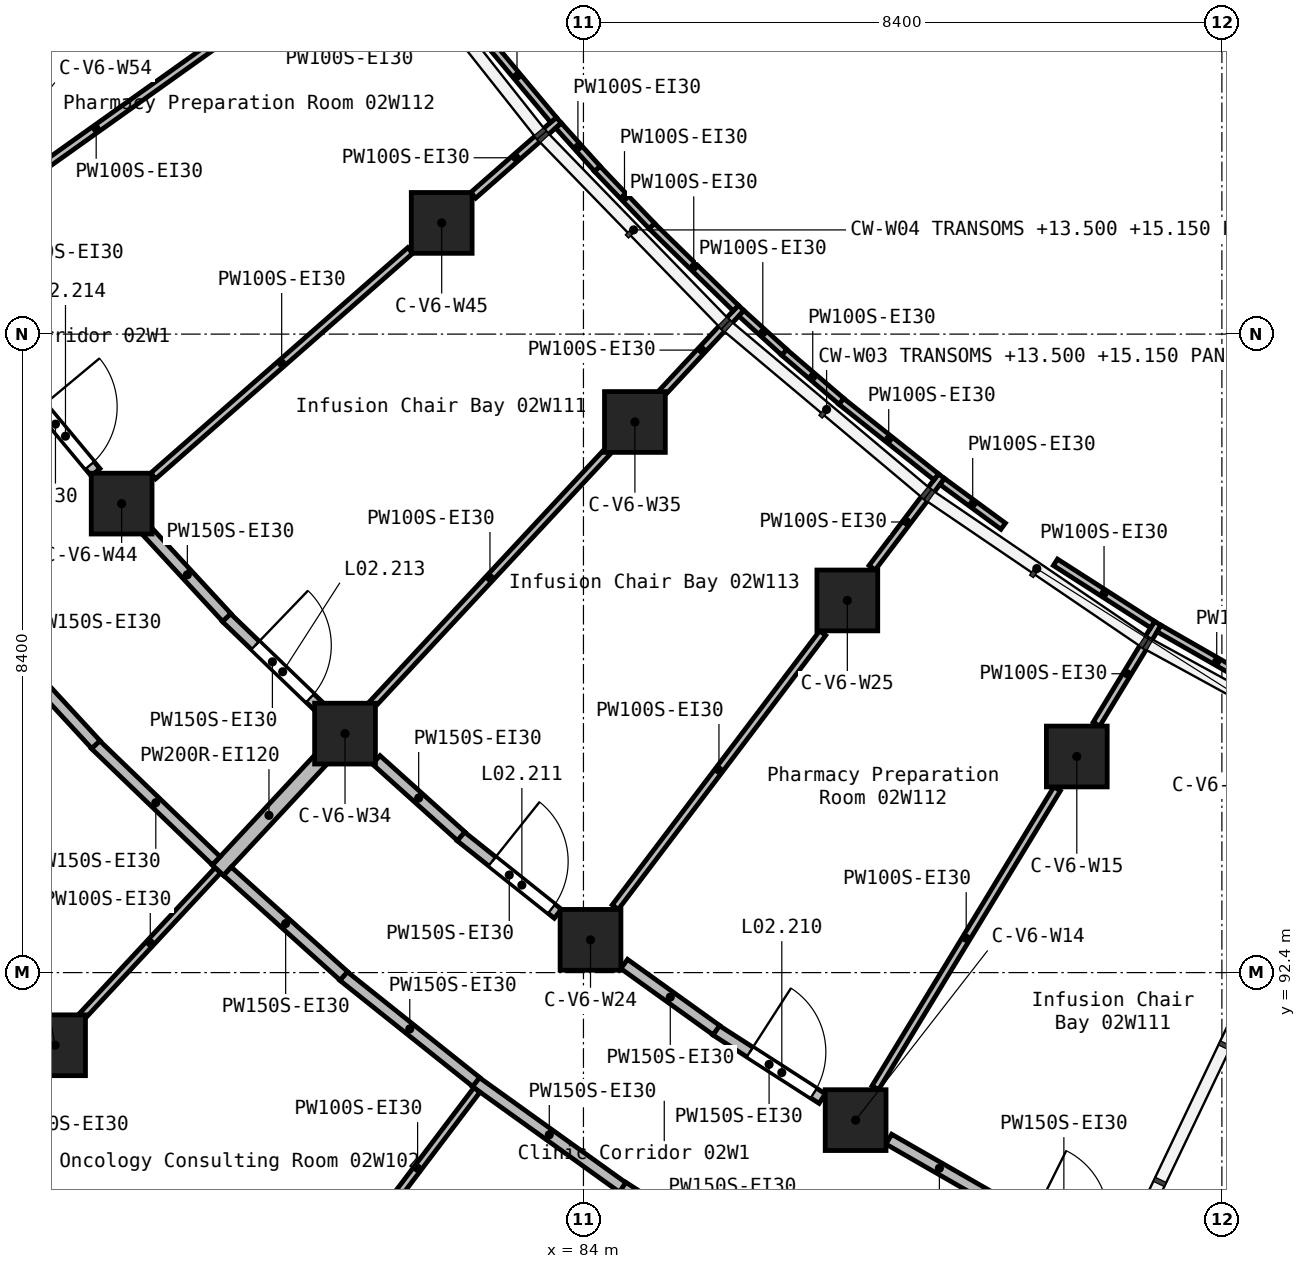
"""IFC4 building model, lengths in metres.
Left out: names, types, materials, properties, quantities, classifications, styles, units other than length and angle.
Written with IfcOpenShell. Run it as: python <this file> out.ifc"""

import sys

from ifc_helpers import new_model, si_unit, direction, frame, frame_2d, origin, origin_2d, place, context, subcontext, project, spatial, rectangle, extrude, element, fill, save


model = new_model("IFC4")
c1 = context("Model", 3, precision=1e-05, world=origin(), true_north=direction((0.0, 1.0)))
c2 = subcontext(c1, "Body", "Model", "MODEL_VIEW")
j1 = project(units=[si_unit("LENGTHUNIT", "METRE"), si_unit("PLANEANGLEUNIT", "RADIAN")], contexts=[c1])
p1 = place(None, origin())
s1 = spatial("IfcSite", under=j1, at=p1, CompositionType="ELEMENT")
p2 = place(p1, origin())
s2 = spatial("IfcBuilding", under=s1, at=p2, CompositionType="ELEMENT")
p3 = place(p2, frame((0.0, 0.0, 12.6)))
s3 = spatial("IfcBuildingStorey", under=s2, at=p3, CompositionType="ELEMENT", Elevation=12.6)
for number, where, z_axis, x_axis in (
    (1, (77.048, 91.444, 0.0), (0.0, 0.0, 1.0), (1.0, 0.0, 0.0)),
    (2, (77.924, 98.57, 0.0), (0.0, 0.0, 1.0), (1.0, 0.0, 0.0)),
    (3, (80.863, 95.544, 0.0), (0.0, 0.0, 1.0), (1.0, 0.0, 0.0)),
    (4, (82.135, 102.263, 0.0), (0.0, 0.0, 1.0), (1.0, 0.0, 0.0)),
    (5, (84.093, 92.831, 0.0), (0.0, 0.0, 1.0), (1.0, 0.0, 0.0)),
    (6, (84.677, 99.644, 0.0), (0.0, 0.0, 1.0), (1.0, 0.0, 0.0)),
    (7, (87.472, 97.296, 0.0), (0.0, 0.0, 1.0), (1.0, 0.0, 0.0)),
    (8, (87.581, 90.459, 0.0), (0.0, 0.0, 1.0), (1.0, 0.0, 0.0)),
    (9, (90.491, 95.243, 0.0), (0.0, 0.0, 1.0), (1.0, 0.0, 0.0)),
):
    element("IfcColumn", number, at=place(p3, frame(where, z_axis=z_axis, x_axis=x_axis)), inside=s3, PredefinedType="COLUMN", context=c2, shape_type="SweptSolid", body=[
        extrude(rectangle(XDim=0.8, YDim=0.8, at=origin_2d()), origin(), (0.0, 0.0, 1.0), 4.2),
    ])
p4 = place(p3, frame((79.19, 93.746, 0.0), z_axis=(0.0, 0.0, 1.0), x_axis=(0.681171780306, 0.732123627344, 0.0)))
e10 = element("IfcWall", 10, at=p4, inside=s3, PredefinedType="SOLIDWALL", context=c2, shape_type="SweptSolid", body=[
    extrude(rectangle(XDim=1.974, YDim=0.2, at=frame_2d((0.987, 0.0))), origin(), (0.0, 0.0, 1.0), 3.85),
])
p5 = place(p3, frame((82.583, 90.961, 0.0), z_axis=(0.0, 0.0, 1.0), x_axis=(0.812456963848, -0.583021167622, 0.0)))
e11 = element("IfcWall", 11, at=p5, inside=s3, PredefinedType="PARTITIONING", context=c2, shape_type="SweptSolid", body=[
    extrude(rectangle(XDim=2.381, YDim=0.15, at=frame_2d((1.191, 0.0))), origin(), (0.0, 0.0, 1.0), 3.85),
])
p6 = place(p3, frame((80.841, 92.356, 0.0), z_axis=(0.0, 0.0, 1.0), x_axis=(0.781561025488, -0.62382879337, 0.0)))
e12 = element("IfcWall", 12, at=p6, inside=s3, PredefinedType="PARTITIONING", context=c2, shape_type="SweptSolid", body=[
    extrude(rectangle(XDim=2.235, YDim=0.15, at=frame_2d((1.118, 0.0))), origin(), (0.0, 0.0, 1.0), 3.85),
])
p7 = place(p3, frame((77.579, 95.4, 0.0), z_axis=(0.0, 0.0, 1.0), x_axis=(0.720594722174, -0.693356507415, 0.0)))
e13 = element("IfcWall", 13, at=p7, inside=s3, PredefinedType="PARTITIONING", context=c2, shape_type="SweptSolid", body=[
    extrude(rectangle(XDim=2.205, YDim=0.15, at=frame_2d((1.103, 0.0))), origin(), (0.0, 0.0, 1.0), 3.85),
])
p8 = place(p3, frame((76.069, 97.043, 0.0), z_axis=(0.0, 0.0, 1.0), x_axis=(0.678030610295, -0.735033666918, 0.0)))
e14 = element("IfcWall", 14, at=p8, inside=s3, PredefinedType="PARTITIONING", context=c2, shape_type="SweptSolid", body=[
    extrude(rectangle(XDim=2.236, YDim=0.15, at=frame_2d((1.118, 0.0))), origin(), (0.0, 0.0, 1.0), 3.85),
])
p9 = place(p3, frame((79.316, 93.733, 0.0), z_axis=(0.0, 0.0, 1.0), x_axis=(0.74346507851, -0.668774758073, 0.0)))
e15 = element("IfcWall", 15, at=p9, inside=s3, PredefinedType="PARTITIONING", context=c2, shape_type="SweptSolid", body=[
    extrude(rectangle(XDim=2.059, YDim=0.15, at=frame_2d((1.03, 0.0))), origin(), (0.0, 0.0, 1.0), 3.85),
])
p10 = place(p3, frame((84.517, 89.577, 0.0), z_axis=(0.0, 0.0, 1.0), x_axis=(0.840935250807, -0.541135753717, 0.0)))
e16 = element("IfcWall", 16, at=p10, inside=s3, PredefinedType="PARTITIONING", context=c2, shape_type="SweptSolid", body=[
    extrude(rectangle(XDim=2.088, YDim=0.15, at=frame_2d((1.044, 0.0))), origin(), (0.0, 0.0, 1.0), 3.85),
])
p11 = place(p3, frame((75.36, 89.74, 0.0), z_axis=(0.0, 0.0, 1.0), x_axis=(0.746361982095, -0.665540225443, 0.0)))
e17 = element("IfcWall", 17, at=p11, inside=s3, PredefinedType="PARTITIONING", context=c2, shape_type="SweptSolid", body=[
    extrude(rectangle(XDim=2.266, YDim=0.15, at=frame_2d((1.133, 0.0))), origin(), (0.0, 0.0, 1.0), 3.85),
])
p12 = place(p11, frame((0.633, 0.0, 0.0)))
e18 = element("IfcOpeningElement", 18, at=p12, cuts=e17, PredefinedType="OPENING", context=c2, shape_type="SweptSolid", body=[
    extrude(rectangle(XDim=1.0, YDim=2.1, at=frame_2d((0.5, 1.05))), frame((0.0, 0.085, 0.0), z_axis=(0.0, -1.0, 0.0), x_axis=(1.0, 0.0, 0.0)), (0.0, 0.0, 1.0), 0.17),
])
p13 = place(p3, frame((82.385, 94.194, 0.0), z_axis=(0.0, 0.0, 1.0), x_axis=(0.781756052881, -0.623584375833, 0.0)))
e19 = element("IfcWall", 19, at=p13, inside=s3, PredefinedType="PARTITIONING", context=c2, shape_type="SweptSolid", body=[
    extrude(rectangle(XDim=1.636, YDim=0.15, at=frame_2d((0.818, 0.0))), origin(), (0.0, 0.0, 1.0), 3.85),
])
p14 = place(p13, frame((0.53, 0.0, 0.0)))
e20 = element("IfcOpeningElement", 20, at=p14, cuts=e19, PredefinedType="OPENING", context=c2, shape_type="SweptSolid", body=[
    extrude(rectangle(XDim=1.0, YDim=2.1, at=frame_2d((0.5, 1.05))), frame((0.0, 0.085, 0.0), z_axis=(0.0, -1.0, 0.0), x_axis=(1.0, 0.0, 0.0)), (0.0, 0.0, 1.0), 0.17),
])
p15 = place(p3, frame((85.744, 91.642, 0.0), z_axis=(0.0, 0.0, 1.0), x_axis=(0.840848932624, -0.54126987031, 0.0)))
e21 = element("IfcWall", 21, at=p15, inside=s3, PredefinedType="PARTITIONING", context=c2, shape_type="SweptSolid", body=[
    extrude(rectangle(XDim=1.662, YDim=0.15, at=frame_2d((0.831, 0.0))), origin(), (0.0, 0.0, 1.0), 3.85),
])
p16 = place(p15, frame((0.53, 0.0, 0.0)))
e22 = element("IfcOpeningElement", 22, at=p16, cuts=e21, PredefinedType="OPENING", context=c2, shape_type="SweptSolid", body=[
    extrude(rectangle(XDim=1.0, YDim=2.1, at=frame_2d((0.5, 1.05))), frame((0.0, 0.085, 0.0), z_axis=(0.0, -1.0, 0.0), x_axis=(1.0, 0.0, 0.0)), (0.0, 0.0, 1.0), 0.17),
])
p17 = place(p3, frame((79.301, 97.072, 0.0), z_axis=(0.0, 0.0, 1.0), x_axis=(0.720465115712, -0.69349118022, 0.0)))
e23 = element("IfcWall", 23, at=p17, inside=s3, PredefinedType="PARTITIONING", context=c2, shape_type="SweptSolid", body=[
    extrude(rectangle(XDim=1.684, YDim=0.15, at=frame_2d((0.842, 0.0))), origin(), (0.0, 0.0, 1.0), 3.85),
])
p18 = place(p17, frame((0.53, 0.0, 0.0)))
e24 = element("IfcOpeningElement", 24, at=p18, cuts=e23, PredefinedType="OPENING", context=c2, shape_type="SweptSolid", body=[
    extrude(rectangle(XDim=1.0, YDim=2.1, at=frame_2d((0.5, 1.05))), frame((0.0, 0.085, 0.0), z_axis=(0.0, -1.0, 0.0), x_axis=(1.0, 0.0, 0.0)), (0.0, 0.0, 1.0), 0.17),
])
p19 = place(p3, frame((84.536, 92.513, 0.0), z_axis=(0.0, 0.0, 1.0), x_axis=(0.81243891359, -0.583046320359, 0.0)))
e25 = element("IfcWall", 25, at=p19, inside=s3, PredefinedType="PARTITIONING", context=c2, shape_type="SweptSolid", body=[
    extrude(rectangle(XDim=1.493, YDim=0.15, at=frame_2d((0.747, 0.0))), origin(), (0.0, 0.0, 1.0), 3.85),
])
p20 = place(p3, frame((78.27, 98.195, 0.0), z_axis=(0.0, 0.0, 1.0), x_axis=(0.678273469528, -0.73480956753, 0.0)))
e26 = element("IfcWall", 26, at=p20, inside=s3, PredefinedType="PARTITIONING", context=c2, shape_type="SweptSolid", body=[
    extrude(rectangle(XDim=1.529, YDim=0.15, at=frame_2d((0.764, 0.0))), origin(), (0.0, 0.0, 1.0), 3.85),
])
p21 = place(p3, frame((76.526, 100.249, 0.0), z_axis=(0.0, 0.0, 1.0), x_axis=(0.640038659854, -0.768342706019, 0.0)))
e27 = element("IfcWall", 27, at=p21, inside=s3, PredefinedType="PARTITIONING", context=c2, shape_type="SweptSolid", body=[
    extrude(rectangle(XDim=1.648, YDim=0.15, at=frame_2d((0.824, 0.0))), origin(), (0.0, 0.0, 1.0), 3.85),
])
p22 = place(p21, frame((0.53, 0.0, 0.0)))
e28 = element("IfcOpeningElement", 28, at=p22, cuts=e27, PredefinedType="OPENING", context=c2, shape_type="SweptSolid", body=[
    extrude(rectangle(XDim=1.0, YDim=2.1, at=frame_2d((0.5, 1.05))), frame((0.0, 0.085, 0.0), z_axis=(0.0, -1.0, 0.0), x_axis=(1.0, 0.0, 0.0)), (0.0, 0.0, 1.0), 0.17),
])
p23 = place(p3, frame((88.018, 90.208, 0.0), z_axis=(0.0, 0.0, 1.0), x_axis=(0.867174234795, -0.498004865947, 0.0)))
e29 = element("IfcWall", 29, at=p23, inside=s3, PredefinedType="PARTITIONING", context=c2, shape_type="SweptSolid", body=[
    extrude(rectangle(XDim=1.535, YDim=0.15, at=frame_2d((0.768, 0.0))), origin(), (0.0, 0.0, 1.0), 3.85),
])
p24 = place(p3, frame((81.273, 95.199, 0.0), z_axis=(0.0, 0.0, 1.0), x_axis=(0.743576936712, -0.668650386368, 0.0)))
e30 = element("IfcWall", 30, at=p24, inside=s3, PredefinedType="PARTITIONING", context=c2, shape_type="SweptSolid", body=[
    extrude(rectangle(XDim=1.502, YDim=0.15, at=frame_2d((0.751, 0.0))), origin(), (0.0, 0.0, 1.0), 3.85),
])
p25 = place(p3, frame((84.418, 93.26, 0.0), z_axis=(0.0, 0.0, 1.0), x_axis=(0.603501117064, 0.797362152163, 0.0)))
e31 = element("IfcWall", 31, at=p25, inside=s3, PredefinedType="PARTITIONING", context=c2, shape_type="SweptSolid", body=[
    extrude(rectangle(XDim=4.522, YDim=0.1, at=frame_2d((2.261, 0.0))), origin(), (0.0, 0.0, 1.0), 3.85),
])
p26 = place(p3, frame((87.798, 97.726, 0.0), z_axis=(0.0, 0.0, 1.0), x_axis=(0.603534256712, 0.797337068607, 0.0)))
e32 = element("IfcWall", 32, at=p26, inside=s3, PredefinedType="PARTITIONING", context=c2, shape_type="SweptSolid", body=[
    extrude(rectangle(XDim=1.512, YDim=0.1, at=frame_2d((0.756, 0.0))), origin(), (0.0, 0.0, 1.0), 3.85),
])
p27 = place(p3, frame((78.338, 98.933, 0.0), z_axis=(0.0, 0.0, 1.0), x_axis=(0.751823288541, 0.659364650863, 0.0)))
e33 = element("IfcWall", 33, at=p27, inside=s3, PredefinedType="PARTITIONING", context=c2, shape_type="SweptSolid", body=[
    extrude(rectangle(XDim=4.5, YDim=0.1, at=frame_2d((2.25, 0.0))), origin(), (0.0, 0.0, 1.0), 3.85),
])
p28 = place(p3, frame((82.549, 102.626, 0.0), z_axis=(0.0, 0.0, 1.0), x_axis=(0.751798799024, 0.659392573347, 0.0)))
e34 = element("IfcWall", 34, at=p28, inside=s3, PredefinedType="PARTITIONING", context=c2, shape_type="SweptSolid", body=[
    extrude(rectangle(XDim=1.498, YDim=0.1, at=frame_2d((0.749, 0.0))), origin(), (0.0, 0.0, 1.0), 3.85),
])
p29 = place(p3, frame((87.84, 90.885, 0.0), z_axis=(0.0, 0.0, 1.0), x_axis=(0.519618801015, 0.854398210223, 0.0)))
e35 = element("IfcWall", 35, at=p29, inside=s3, PredefinedType="PARTITIONING", context=c2, shape_type="SweptSolid", body=[
    extrude(rectangle(XDim=4.603, YDim=0.1, at=frame_2d((2.302, 0.0))), origin(), (0.0, 0.0, 1.0), 3.85),
])
p30 = place(p3, frame((90.75, 95.668, 0.0), z_axis=(0.0, 0.0, 1.0), x_axis=(0.519552672181, 0.854438424247, 0.0)))
e36 = element("IfcWall", 36, at=p30, inside=s3, PredefinedType="PARTITIONING", context=c2, shape_type="SweptSolid", body=[
    extrude(rectangle(XDim=1.552, YDim=0.1, at=frame_2d((0.776, 0.0))), origin(), (0.0, 0.0, 1.0), 3.85),
])
p31 = place(p3, frame((75.736, 102.183, 0.0), z_axis=(0.0, 0.0, 1.0), x_axis=(0.8147152487, 0.579861245072, 0.0)))
e37 = element("IfcWall", 37, at=p31, inside=s3, PredefinedType="PARTITIONING", context=c2, shape_type="SweptSolid", body=[
    extrude(rectangle(XDim=4.548, YDim=0.1, at=frame_2d((2.274, 0.0))), origin(), (0.0, 0.0, 1.0), 3.85),
])
p32 = place(p3, frame((81.227, 95.935, 0.0), z_axis=(0.0, 0.0, 1.0), x_axis=(0.681211440492, 0.732086725288, 0.0)))
e38 = element("IfcWall", 38, at=p32, inside=s3, PredefinedType="PARTITIONING", context=c2, shape_type="SweptSolid", body=[
    extrude(rectangle(XDim=4.53, YDim=0.1, at=frame_2d((2.265, 0.0))), origin(), (0.0, 0.0, 1.0), 3.85),
])
p33 = place(p3, frame((85.041, 100.034, 0.0), z_axis=(0.0, 0.0, 1.0), x_axis=(0.681296599079, 0.732007475428, 0.0)))
e39 = element("IfcWall", 39, at=p33, inside=s3, PredefinedType="PARTITIONING", context=c2, shape_type="SweptSolid", body=[
    extrude(rectangle(XDim=1.517, YDim=0.1, at=frame_2d((0.758, 0.0))), origin(), (0.0, 0.0, 1.0), 3.85),
])
p34 = place(p3, frame((77.412, 91.835, 0.0), z_axis=(0.0, 0.0, 1.0), x_axis=(0.681147107729, 0.732146582067, 0.0)))
e40 = element("IfcWall", 40, at=p34, inside=s3, PredefinedType="PARTITIONING", context=c2, shape_type="SweptSolid", body=[
    extrude(rectangle(XDim=2.609, YDim=0.1, at=frame_2d((1.304, 0.0))), origin(), (0.0, 0.0, 1.0), 3.85),
])
p35 = place(p3, frame((81.038, 88.796, 0.0), z_axis=(0.0, 0.0, 1.0), x_axis=(0.603561177332, 0.797316690668, 0.0)))
e41 = element("IfcWall", 41, at=p35, inside=s3, PredefinedType="PARTITIONING", context=c2, shape_type="SweptSolid", body=[
    extrude(rectangle(XDim=2.584, YDim=0.1, at=frame_2d((1.292, 0.0))), origin(), (0.0, 0.0, 1.0), 3.85),
])
p36 = place(p3, frame((91.572, 96.928, 0.0), z_axis=(0.0, 0.0, 1.0), x_axis=(0.867607434085, -0.497249776591, 0.0)))
e42 = element("IfcWall", 42, at=p36, inside=s3, PredefinedType="PARTITIONING", context=c2, shape_type="SweptSolid", body=[
    extrude(rectangle(XDim=1.751, YDim=0.1, at=frame_2d((0.875, 0.0))), origin(), (0.0, 0.0, 1.0), 3.85),
])
p37 = place(p3, frame((87.391, 99.916, 0.0), z_axis=(0.0, 0.0, 1.0), x_axis=(0.7827431138, -0.622344934742, 0.0)))
e43 = element("IfcWall", 43, at=p37, inside=s3, PredefinedType="PARTITIONING", context=c2, shape_type="SweptSolid", body=[
    extrude(rectangle(XDim=1.598, YDim=0.1, at=frame_2d((0.799, 0.0))), origin(), (0.0, 0.0, 1.0), 3.85),
])
p38 = place(p3, frame((90.21, 97.798, 0.0), z_axis=(0.0, 0.0, 1.0), x_axis=(0.841976481819, -0.539514229713, 0.0)))
e44 = element("IfcWall", 44, at=p38, inside=s3, PredefinedType="PARTITIONING", context=c2, shape_type="SweptSolid", body=[
    extrude(rectangle(XDim=1.519, YDim=0.1, at=frame_2d((0.76, 0.0))), origin(), (0.0, 0.0, 1.0), 3.85),
])
p39 = place(p3, frame((84.897, 102.224, 0.0), z_axis=(0.0, 0.0, 1.0), x_axis=(0.715491637519, -0.698621297013, 0.0)))
e45 = element("IfcWall", 45, at=p39, inside=s3, PredefinedType="PARTITIONING", context=c2, shape_type="SweptSolid", body=[
    extrude(rectangle(XDim=1.548, YDim=0.1, at=frame_2d((0.774, 0.0))), origin(), (0.0, 0.0, 1.0), 3.85),
])
p40 = place(p3, frame((82.645, 104.768, 0.0), z_axis=(0.0, 0.0, 1.0), x_axis=(0.641529064264, -0.767098728785, 0.0)))
e46 = element("IfcWall", 46, at=p40, inside=s3, PredefinedType="PARTITIONING", context=c2, shape_type="SweptSolid", body=[
    extrude(rectangle(XDim=1.499, YDim=0.1, at=frame_2d((0.75, 0.0))), origin(), (0.0, 0.0, 1.0), 3.85),
])
p41 = place(p3, frame((88.721, 98.861, 0.0), z_axis=(0.0, 0.0, 1.0), x_axis=(0.806061198055, -0.591832193269, 0.0)))
e47 = element("IfcWall", 47, at=p41, inside=s3, PredefinedType="PARTITIONING", context=c2, shape_type="SweptSolid", body=[
    extrude(rectangle(XDim=0.994, YDim=0.1, at=frame_2d((0.497, 0.0))), origin(), (0.0, 0.0, 1.0), 3.85),
])
p42 = place(p3, frame((84.18, 102.976, 0.0), z_axis=(0.0, 0.0, 1.0), x_axis=(0.691094804644, -0.722764118502, 0.0)))
e48 = element("IfcWall", 48, at=p42, inside=s3, PredefinedType="PARTITIONING", context=c2, shape_type="SweptSolid", body=[
    extrude(rectangle(XDim=1.041, YDim=0.1, at=frame_2d((0.521, 0.0))), origin(), (0.0, 0.0, 1.0), 3.85),
])
p43 = place(p3, frame((86.64, 100.562, 0.0), z_axis=(0.0, 0.0, 1.0), x_axis=(0.759638737838, -0.650345283658, 0.0)))
e49 = element("IfcWall", 49, at=p43, inside=s3, PredefinedType="PARTITIONING", context=c2, shape_type="SweptSolid", body=[
    extrude(rectangle(XDim=0.992, YDim=0.1, at=frame_2d((0.496, 0.0))), origin(), (0.0, 0.0, 1.0), 3.85),
])
p44 = place(p3, frame((83.672, 103.543, 0.0), z_axis=(0.0, 0.0, 1.0), x_axis=(0.66903540409, -0.743230534945, 0.0)))
e50 = element("IfcWall", 50, at=p44, inside=s3, PredefinedType="PARTITIONING", context=c2, shape_type="SweptSolid", body=[
    extrude(rectangle(XDim=0.763, YDim=0.1, at=frame_2d((0.382, 0.0))), origin(), (0.0, 0.0, 1.0), 3.85),
])
p45 = place(p3, frame((86.077, 101.074, 0.0), z_axis=(0.0, 0.0, 1.0), x_axis=(0.740693092669, -0.671843540173, 0.0)))
e51 = element("IfcWall", 51, at=p45, inside=s3, PredefinedType="PARTITIONING", context=c2, shape_type="SweptSolid", body=[
    extrude(rectangle(XDim=0.762, YDim=0.1, at=frame_2d((0.381, 0.0))), origin(), (0.0, 0.0, 1.0), 3.85),
])
p46 = place(p16, origin())
e52 = element("IfcDoor", 52, at=p46, inside=s3, OperationType="SINGLE_SWING_RIGHT", PredefinedType="DOOR", context=c2, shape_type="SweptSolid", body=[
    extrude(rectangle(XDim=1.0, YDim=2.1, at=frame_2d((0.5, 1.05))), frame((0.0, 0.025, 0.0), z_axis=(0.0, -1.0, 0.0), x_axis=(1.0, 0.0, 0.0)), (0.0, 0.0, 1.0), 0.05),
])
fill(e22, e52)
p47 = place(p14, origin())
e53 = element("IfcDoor", 53, at=p47, inside=s3, OperationType="SINGLE_SWING_RIGHT", PredefinedType="DOOR", context=c2, shape_type="SweptSolid", body=[
    extrude(rectangle(XDim=1.0, YDim=2.1, at=frame_2d((0.5, 1.05))), frame((0.0, 0.025, 0.0), z_axis=(0.0, -1.0, 0.0), x_axis=(1.0, 0.0, 0.0)), (0.0, 0.0, 1.0), 0.05),
])
fill(e20, e53)
p48 = place(p18, origin())
e54 = element("IfcDoor", 54, at=p48, inside=s3, OperationType="SINGLE_SWING_RIGHT", PredefinedType="DOOR", context=c2, shape_type="SweptSolid", body=[
    extrude(rectangle(XDim=1.0, YDim=2.1, at=frame_2d((0.5, 1.05))), frame((0.0, 0.025, 0.0), z_axis=(0.0, -1.0, 0.0), x_axis=(1.0, 0.0, 0.0)), (0.0, 0.0, 1.0), 0.05),
])
fill(e24, e54)
p49 = place(p22, origin())
e55 = element("IfcDoor", 55, at=p49, inside=s3, OperationType="SINGLE_SWING_RIGHT", PredefinedType="DOOR", context=c2, shape_type="SweptSolid", body=[
    extrude(rectangle(XDim=1.0, YDim=2.1, at=frame_2d((0.5, 1.05))), frame((0.0, 0.025, 0.0), z_axis=(0.0, -1.0, 0.0), x_axis=(1.0, 0.0, 0.0)), (0.0, 0.0, 1.0), 0.05),
])
fill(e28, e55)
save(model, sys.argv[1])
